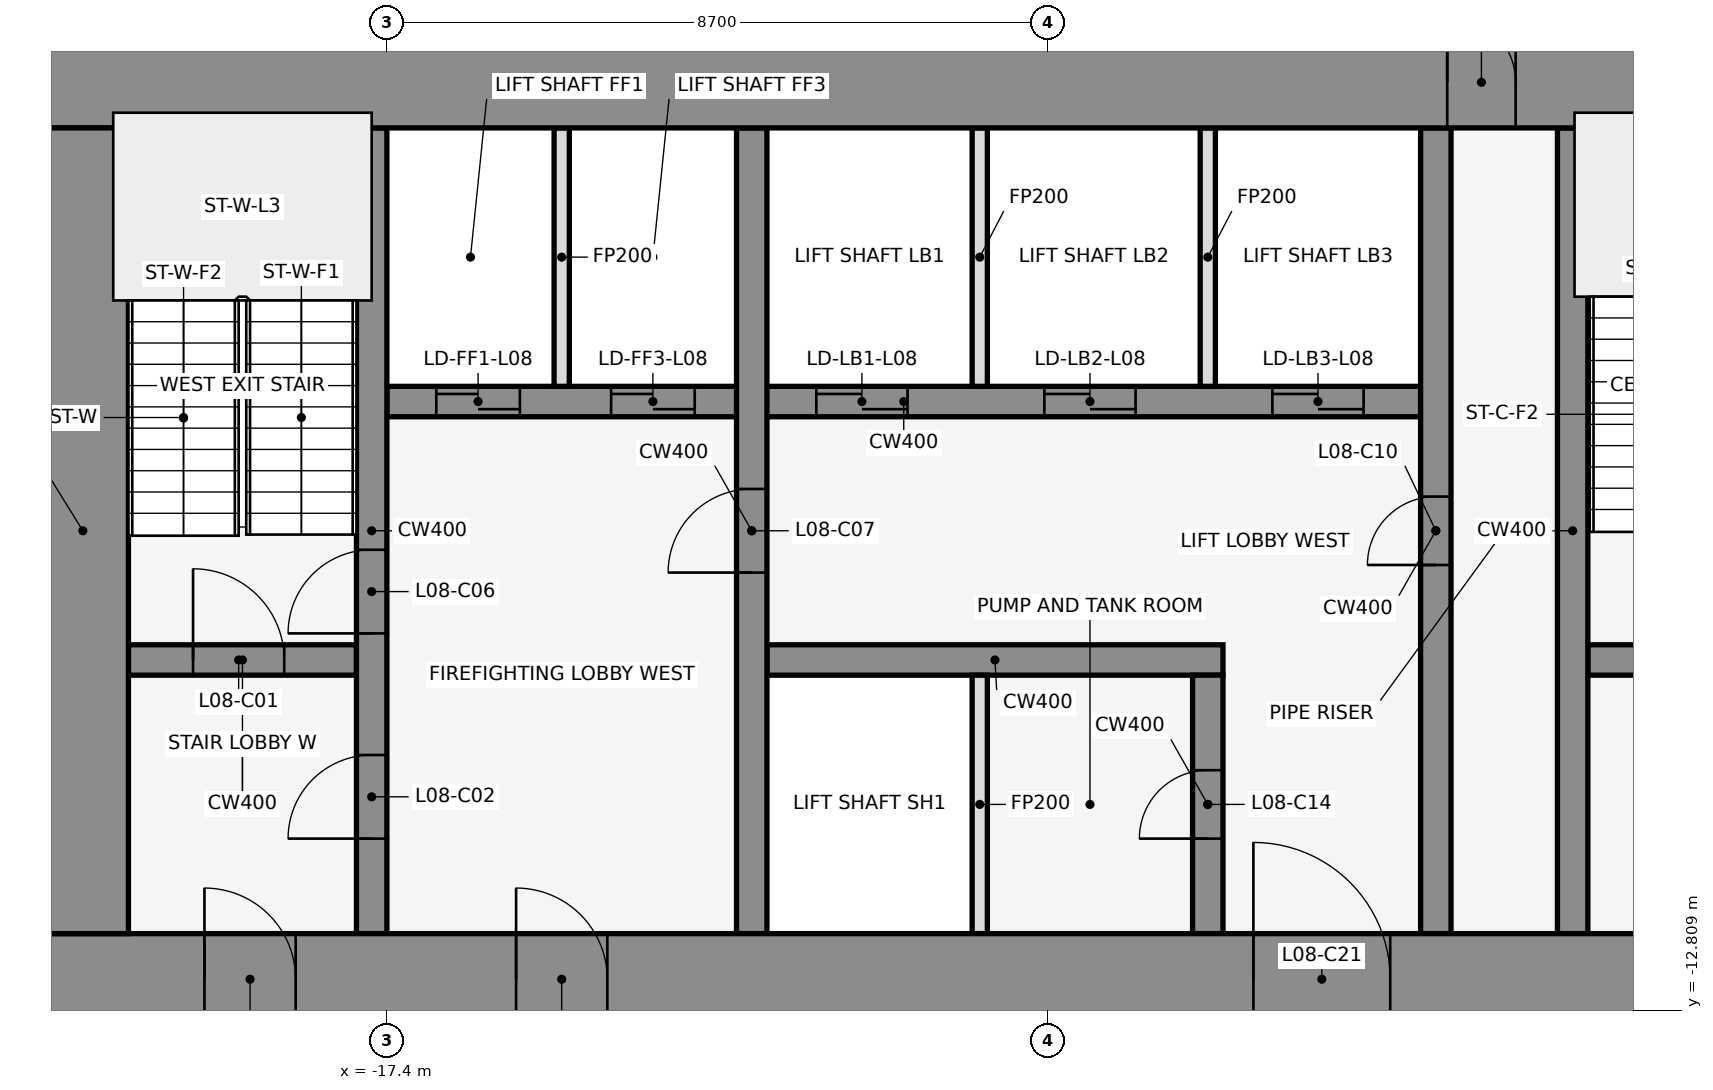
"""IFC4 building model, lengths in metres.
Left out: names, types, materials, properties, quantities, classifications, styles, units other than length and angle.
Written with IfcOpenShell. Run it as: python <this file> out.ifc"""

import sys

from ifc_helpers import new_model, si_unit, direction, frame, frame_2d, origin, place, context, subcontext, project, spatial, rectangle, extrude, element, fill, save


model = new_model("IFC4")
c1 = context("Model", 3, precision=1e-05, world=origin(), true_north=direction((0.0, 1.0)))
c2 = subcontext(c1, "Body", "Model", "MODEL_VIEW")
j1 = project(units=[si_unit("LENGTHUNIT", "METRE"), si_unit("PLANEANGLEUNIT", "RADIAN")], contexts=[c1])
p1 = place(None, origin())
s1 = spatial("IfcSite", under=j1, at=p1, CompositionType="ELEMENT")
p2 = place(p1, origin())
s2 = spatial("IfcBuilding", under=s1, at=p2, CompositionType="ELEMENT")
p3 = place(p2, frame((0.0, 0.0, 44.0)))
s3 = spatial("IfcBuildingStorey", under=s2, at=p3, CompositionType="ELEMENT", Elevation=44.0)
for number, where, z_axis, x_axis in (
    (1, (-0.068, -0.105, 0.0), (0.0, 0.0, 1.0), (-0.84, 0.543, 0.0)),
    (2, (-14.599, 1.08, 0.0), (0.0, 0.0, 1.0), (-0.84, -0.543, 0.0)),
):
    element("IfcWall", number, at=place(p3, frame(where, z_axis=z_axis, x_axis=x_axis)), inside=s3, PredefinedType="STANDARD", context=c2, shape_type="SweptSolid", body=[
        extrude(rectangle(XDim=2.183, YDim=0.25, at=frame_2d((1.091, 0.0))), origin(), (0.0, 0.0, 1.0), 4.35),
    ])
p4 = place(p3, frame((-20.8, -8.2, 0.0), z_axis=(0.0, 0.0, 1.0), x_axis=(1.0, 0.0, 0.0)))
e3 = element("IfcWall", 3, at=p4, inside=s3, PredefinedType="SHEAR", context=c2, shape_type="SweptSolid", body=[
    extrude(rectangle(XDim=3.0, YDim=0.4, at=frame_2d((1.5, 0.0))), origin(), (0.0, 0.0, 1.0), 4.5),
])
p5 = place(p4, frame((0.85, 0.0, 0.0)))
e4 = element("IfcOpeningElement", 4, at=p5, cuts=e3, PredefinedType="OPENING", context=c2, shape_type="SweptSolid", body=[
    extrude(rectangle(XDim=1.2, YDim=2.1, at=frame_2d((0.6, 1.05))), frame((0.0, 0.212, 0.0), z_axis=(0.0, -1.0, 0.0), x_axis=(1.0, 0.0, 0.0)), (0.0, 0.0, 1.0), 0.424),
])
p6 = place(p3, frame((-12.4, -8.2, 0.0), z_axis=(0.0, 0.0, 1.0), x_axis=(1.0, 0.0, 0.0)))
e5 = element("IfcWall", 5, at=p6, inside=s3, PredefinedType="SHEAR", context=c2, shape_type="SweptSolid", body=[
    extrude(rectangle(XDim=6.0, YDim=0.4, at=frame_2d((3.0, 0.0))), origin(), (0.0, 0.0, 1.0), 4.5),
])
p7 = place(p3, frame((-1.6, -8.2, 0.0), z_axis=(0.0, 0.0, 1.0), x_axis=(1.0, 0.0, 0.0)))
e6 = element("IfcWall", 6, at=p7, inside=s3, PredefinedType="SHEAR", context=c2, shape_type="SweptSolid", body=[
    extrude(rectangle(XDim=3.2, YDim=0.4, at=frame_2d((1.6, 0.0))), origin(), (0.0, 0.0, 1.0), 4.5),
])
p8 = place(p7, frame((1.05, 0.0, 0.0)))
e7 = element("IfcOpeningElement", 7, at=p8, cuts=e6, PredefinedType="OPENING", context=c2, shape_type="SweptSolid", body=[
    extrude(rectangle(XDim=1.2, YDim=2.1, at=frame_2d((0.6, 1.05))), frame((0.0, 0.212, 0.0), z_axis=(0.0, -1.0, 0.0), x_axis=(1.0, 0.0, 0.0)), (0.0, 0.0, 1.0), 0.424),
])
p9 = place(p3, frame((-17.4, -4.8, 0.0), z_axis=(0.0, 0.0, 1.0), x_axis=(1.0, 0.0, 0.0)))
e8 = element("IfcWall", 8, at=p9, inside=s3, PredefinedType="SHEAR", context=c2, shape_type="SweptSolid", body=[
    extrude(rectangle(XDim=13.6, YDim=0.4, at=frame_2d((6.8, 0.0))), origin(), (0.0, 0.0, 1.0), 4.5),
])
p10 = place(p9, frame((0.65, 0.0, 0.0)))
e9 = element("IfcOpeningElement", 9, at=p10, cuts=e8, PredefinedType="OPENING", context=c2, shape_type="SweptSolid", body=[
    extrude(rectangle(XDim=1.1, YDim=2.1, at=frame_2d((0.55, 1.05))), frame((0.0, 0.212, 0.0), z_axis=(0.0, -1.0, 0.0), x_axis=(1.0, 0.0, 0.0)), (0.0, 0.0, 1.0), 0.424),
])
p11 = place(p9, frame((2.95, 0.0, 0.0)))
e10 = element("IfcOpeningElement", 10, at=p11, cuts=e8, PredefinedType="OPENING", context=c2, shape_type="SweptSolid", body=[
    extrude(rectangle(XDim=1.1, YDim=2.1, at=frame_2d((0.55, 1.05))), frame((0.0, 0.212, 0.0), z_axis=(0.0, -1.0, 0.0), x_axis=(1.0, 0.0, 0.0)), (0.0, 0.0, 1.0), 0.424),
])
p12 = place(p9, frame((5.65, 0.0, 0.0)))
e11 = element("IfcOpeningElement", 11, at=p12, cuts=e8, PredefinedType="OPENING", context=c2, shape_type="SweptSolid", body=[
    extrude(rectangle(XDim=1.2, YDim=2.1, at=frame_2d((0.6, 1.05))), frame((0.0, 0.212, 0.0), z_axis=(0.0, -1.0, 0.0), x_axis=(1.0, 0.0, 0.0)), (0.0, 0.0, 1.0), 0.424),
])
p13 = place(p9, frame((8.65, 0.0, 0.0)))
e12 = element("IfcOpeningElement", 12, at=p13, cuts=e8, PredefinedType="OPENING", context=c2, shape_type="SweptSolid", body=[
    extrude(rectangle(XDim=1.2, YDim=2.1, at=frame_2d((0.6, 1.05))), frame((0.0, 0.212, 0.0), z_axis=(0.0, -1.0, 0.0), x_axis=(1.0, 0.0, 0.0)), (0.0, 0.0, 1.0), 0.424),
])
p14 = place(p9, frame((11.65, 0.0, 0.0)))
e13 = element("IfcOpeningElement", 13, at=p14, cuts=e8, PredefinedType="OPENING", context=c2, shape_type="SweptSolid", body=[
    extrude(rectangle(XDim=1.2, YDim=2.1, at=frame_2d((0.6, 1.05))), frame((0.0, 0.212, 0.0), z_axis=(0.0, -1.0, 0.0), x_axis=(1.0, 0.0, 0.0)), (0.0, 0.0, 1.0), 0.424),
])
p15 = place(p3, frame((-17.6, -11.8, 0.0), z_axis=(0.0, 0.0, 1.0), x_axis=(0.0, 1.0, 0.0)))
e14 = element("IfcWall", 14, at=p15, inside=s3, PredefinedType="SHEAR", context=c2, shape_type="SweptSolid", body=[
    extrude(rectangle(XDim=10.6, YDim=0.4, at=frame_2d((5.3, 0.0))), origin(), (0.0, 0.0, 1.0), 4.5),
])
p16 = place(p15, frame((1.25, 0.0, 0.0)))
e15 = element("IfcOpeningElement", 15, at=p16, cuts=e14, PredefinedType="OPENING", context=c2, shape_type="SweptSolid", body=[
    extrude(rectangle(XDim=1.1, YDim=2.1, at=frame_2d((0.55, 1.05))), frame((0.0, 0.212, 0.0), z_axis=(0.0, -1.0, 0.0), x_axis=(1.0, 0.0, 0.0)), (0.0, 0.0, 1.0), 0.424),
])
p17 = place(p15, frame((3.95, 0.0, 0.0)))
e16 = element("IfcOpeningElement", 16, at=p17, cuts=e14, PredefinedType="OPENING", context=c2, shape_type="SweptSolid", body=[
    extrude(rectangle(XDim=1.1, YDim=2.1, at=frame_2d((0.55, 1.05))), frame((0.0, 0.212, 0.0), z_axis=(0.0, -1.0, 0.0), x_axis=(1.0, 0.0, 0.0)), (0.0, 0.0, 1.0), 0.424),
])
p18 = place(p3, frame((-15.1, -4.6, 0.0), z_axis=(0.0, 0.0, 1.0), x_axis=(0.0, 1.0, 0.0)))
e17 = element("IfcWall", 17, at=p18, inside=s3, PredefinedType="PARTITIONING", context=c2, shape_type="SweptSolid", body=[
    extrude(rectangle(XDim=3.4, YDim=0.2, at=frame_2d((1.7, 0.0))), origin(), (0.0, 0.0, 1.0), 3.418),
])
p19 = place(p3, frame((-12.6, -11.8, 0.0), z_axis=(0.0, 0.0, 1.0), x_axis=(0.0, 1.0, 0.0)))
e18 = element("IfcWall", 18, at=p19, inside=s3, PredefinedType="SHEAR", context=c2, shape_type="SweptSolid", body=[
    extrude(rectangle(XDim=10.6, YDim=0.4, at=frame_2d((5.3, 0.0))), origin(), (0.0, 0.0, 1.0), 4.5),
])
p20 = place(p19, frame((4.75, 0.0, 0.0)))
e19 = element("IfcOpeningElement", 19, at=p20, cuts=e18, PredefinedType="OPENING", context=c2, shape_type="SweptSolid", body=[
    extrude(rectangle(XDim=1.1, YDim=2.1, at=frame_2d((0.55, 1.05))), frame((0.0, 0.212, 0.0), z_axis=(0.0, -1.0, 0.0), x_axis=(1.0, 0.0, 0.0)), (0.0, 0.0, 1.0), 0.424),
])
for number, where, z_axis, x_axis in (
    (20, (-9.6, -11.8, 0.0), (0.0, 0.0, 1.0), (0.0, 1.0, 0.0)),
    (21, (-9.6, -4.6, 0.0), (0.0, 0.0, 1.0), (0.0, 1.0, 0.0)),
):
    element("IfcWall", number, at=place(p3, frame(where, z_axis=z_axis, x_axis=x_axis)), inside=s3, PredefinedType="PARTITIONING", context=c2, shape_type="SweptSolid", body=[
        extrude(rectangle(XDim=3.4, YDim=0.2, at=frame_2d((1.7, 0.0))), origin(), (0.0, 0.0, 1.0), 3.418),
    ])
p21 = place(p3, frame((-6.6, -11.8, 0.0), z_axis=(0.0, 0.0, 1.0), x_axis=(0.0, 1.0, 0.0)))
e22 = element("IfcWall", 22, at=p21, inside=s3, PredefinedType="SHEAR", context=c2, shape_type="SweptSolid", body=[
    extrude(rectangle(XDim=3.4, YDim=0.4, at=frame_2d((1.7, 0.0))), origin(), (0.0, 0.0, 1.0), 4.5),
])
p22 = place(p21, frame((1.25, 0.0, 0.0)))
e23 = element("IfcOpeningElement", 23, at=p22, cuts=e22, PredefinedType="OPENING", context=c2, shape_type="SweptSolid", body=[
    extrude(rectangle(XDim=0.9, YDim=2.1, at=frame_2d((0.45, 1.05))), frame((0.0, 0.212, 0.0), z_axis=(0.0, -1.0, 0.0), x_axis=(1.0, 0.0, 0.0)), (0.0, 0.0, 1.0), 0.424),
])
p23 = place(p3, frame((-6.6, -4.6, 0.0), z_axis=(0.0, 0.0, 1.0), x_axis=(0.0, 1.0, 0.0)))
e24 = element("IfcWall", 24, at=p23, inside=s3, PredefinedType="PARTITIONING", context=c2, shape_type="SweptSolid", body=[
    extrude(rectangle(XDim=3.4, YDim=0.2, at=frame_2d((1.7, 0.0))), origin(), (0.0, 0.0, 1.0), 3.418),
])
p24 = place(p3, frame((-3.6, -11.8, 0.0), z_axis=(0.0, 0.0, 1.0), x_axis=(0.0, 1.0, 0.0)))
e25 = element("IfcWall", 25, at=p24, inside=s3, PredefinedType="SHEAR", context=c2, shape_type="SweptSolid", body=[
    extrude(rectangle(XDim=10.6, YDim=0.4, at=frame_2d((5.3, 0.0))), origin(), (0.0, 0.0, 1.0), 4.5),
])
p25 = place(p24, frame((4.85, 0.0, 0.0)))
e26 = element("IfcOpeningElement", 26, at=p25, cuts=e25, PredefinedType="OPENING", context=c2, shape_type="SweptSolid", body=[
    extrude(rectangle(XDim=0.9, YDim=2.1, at=frame_2d((0.45, 1.05))), frame((0.0, 0.212, 0.0), z_axis=(0.0, -1.0, 0.0), x_axis=(1.0, 0.0, 0.0)), (0.0, 0.0, 1.0), 0.424),
])
p26 = place(p3, frame((-1.8, -11.8, 0.0), z_axis=(0.0, 0.0, 1.0), x_axis=(0.0, 1.0, 0.0)))
e27 = element("IfcWall", 27, at=p26, inside=s3, PredefinedType="SHEAR", context=c2, shape_type="SweptSolid", body=[
    extrude(rectangle(XDim=10.6, YDim=0.4, at=frame_2d((5.3, 0.0))), origin(), (0.0, 0.0, 1.0), 4.5),
])
p27 = place(p3, frame((-22.0, -0.6, 0.0), z_axis=(0.0, 0.0, 1.0), x_axis=(1.0, 0.0, 0.0)))
e28 = element("IfcWall", 28, at=p27, inside=s3, PredefinedType="SHEAR", context=c2, shape_type="SweptSolid", body=[
    extrude(rectangle(XDim=44.0, YDim=1.2, at=frame_2d((22.0, 0.0))), origin(), (0.0, 0.0, 1.0), 4.5),
])
p28 = place(p27, frame((18.55, 0.0, 0.0)))
e29 = element("IfcOpeningElement", 29, at=p28, cuts=e28, PredefinedType="OPENING", context=c2, shape_type="SweptSolid", body=[
    extrude(rectangle(XDim=0.9, YDim=2.1, at=frame_2d((0.45, 1.05))), frame((0.0, 0.612, 0.0), z_axis=(0.0, -1.0, 0.0), x_axis=(1.0, 0.0, 0.0)), (0.0, 0.0, 1.0), 1.224),
])
p29 = place(p27, frame((24.55, 0.0, 0.0)))
e30 = element("IfcOpeningElement", 30, at=p29, cuts=e28, PredefinedType="OPENING", context=c2, shape_type="SweptSolid", body=[
    extrude(rectangle(XDim=0.9, YDim=2.1, at=frame_2d((0.45, 1.05))), frame((0.0, 0.612, 0.0), z_axis=(0.0, -1.0, 0.0), x_axis=(1.0, 0.0, 0.0)), (0.0, 0.0, 1.0), 1.224),
])
p30 = place(p3, frame((-22.0, -12.4, 0.0), z_axis=(0.0, 0.0, 1.0), x_axis=(1.0, 0.0, 0.0)))
e31 = element("IfcWall", 31, at=p30, inside=s3, PredefinedType="SHEAR", context=c2, shape_type="SweptSolid", body=[
    extrude(rectangle(XDim=44.0, YDim=1.2, at=frame_2d((22.0, 0.0))), origin(), (0.0, 0.0, 1.0), 4.5),
])
p31 = place(p30, frame((2.2, 0.0, 0.0)))
e32 = element("IfcOpeningElement", 32, at=p31, cuts=e31, PredefinedType="OPENING", context=c2, shape_type="SweptSolid", body=[
    extrude(rectangle(XDim=1.2, YDim=2.1, at=frame_2d((0.6, 1.05))), frame((0.0, 0.612, 0.0), z_axis=(0.0, -1.0, 0.0), x_axis=(1.0, 0.0, 0.0)), (0.0, 0.0, 1.0), 1.224),
])
p32 = place(p30, frame((21.4, 0.0, 0.0)))
e33 = element("IfcOpeningElement", 33, at=p32, cuts=e31, PredefinedType="OPENING", context=c2, shape_type="SweptSolid", body=[
    extrude(rectangle(XDim=1.2, YDim=2.1, at=frame_2d((0.6, 1.05))), frame((0.0, 0.612, 0.0), z_axis=(0.0, -1.0, 0.0), x_axis=(1.0, 0.0, 0.0)), (0.0, 0.0, 1.0), 1.224),
])
p33 = place(p30, frame((40.6, 0.0, 0.0)))
e34 = element("IfcOpeningElement", 34, at=p33, cuts=e31, PredefinedType="OPENING", context=c2, shape_type="SweptSolid", body=[
    extrude(rectangle(XDim=1.2, YDim=2.1, at=frame_2d((0.6, 1.05))), frame((0.0, 0.612, 0.0), z_axis=(0.0, -1.0, 0.0), x_axis=(1.0, 0.0, 0.0)), (0.0, 0.0, 1.0), 1.224),
])
p34 = place(p30, frame((16.0, 0.0, 0.0)))
e35 = element("IfcOpeningElement", 35, at=p34, cuts=e31, PredefinedType="OPENING", context=c2, shape_type="SweptSolid", body=[
    extrude(rectangle(XDim=1.8, YDim=2.1, at=frame_2d((0.9, 1.05))), frame((0.0, 0.612, 0.0), z_axis=(0.0, -1.0, 0.0), x_axis=(1.0, 0.0, 0.0)), (0.0, 0.0, 1.0), 1.224),
])
p35 = place(p30, frame((6.3, 0.0, 0.0)))
e36 = element("IfcOpeningElement", 36, at=p35, cuts=e31, PredefinedType="OPENING", context=c2, shape_type="SweptSolid", body=[
    extrude(rectangle(XDim=1.2, YDim=2.1, at=frame_2d((0.6, 1.05))), frame((0.0, 0.612, 0.0), z_axis=(0.0, -1.0, 0.0), x_axis=(1.0, 0.0, 0.0)), (0.0, 0.0, 1.0), 1.224),
])
p36 = place(p30, frame((26.2, 0.0, 0.0)))
e37 = element("IfcOpeningElement", 37, at=p36, cuts=e31, PredefinedType="OPENING", context=c2, shape_type="SweptSolid", body=[
    extrude(rectangle(XDim=1.8, YDim=2.1, at=frame_2d((0.9, 1.05))), frame((0.0, 0.612, 0.0), z_axis=(0.0, -1.0, 0.0), x_axis=(1.0, 0.0, 0.0)), (0.0, 0.0, 1.0), 1.224),
])
p37 = place(p30, frame((36.5, 0.0, 0.0)))
e38 = element("IfcOpeningElement", 38, at=p37, cuts=e31, PredefinedType="OPENING", context=c2, shape_type="SweptSolid", body=[
    extrude(rectangle(XDim=1.2, YDim=2.1, at=frame_2d((0.6, 1.05))), frame((0.0, 0.612, 0.0), z_axis=(0.0, -1.0, 0.0), x_axis=(1.0, 0.0, 0.0)), (0.0, 0.0, 1.0), 1.224),
])
p38 = place(p3, frame((-21.4, -11.8, 0.0), z_axis=(0.0, 0.0, 1.0), x_axis=(0.0, 1.0, 0.0)))
e39 = element("IfcWall", 39, at=p38, inside=s3, PredefinedType="SHEAR", context=c2, shape_type="SweptSolid", body=[
    extrude(rectangle(XDim=10.6, YDim=1.2, at=frame_2d((5.3, 0.0))), origin(), (0.0, 0.0, 1.0), 4.5),
])
p39 = place(p5, origin())
e40 = element("IfcDoor", 40, at=p39, inside=s3, OperationType="SINGLE_SWING_LEFT", PredefinedType="DOOR", context=c2, shape_type="SweptSolid", body=[
    extrude(rectangle(XDim=1.2, YDim=2.1, at=frame_2d((0.6, 1.05))), frame((0.0, 0.025, 0.0), z_axis=(0.0, -1.0, 0.0), x_axis=(1.0, 0.0, 0.0)), (0.0, 0.0, 1.0), 0.05),
])
fill(e4, e40)
p40 = place(p16, frame((1.1, 0.0, 0.0), z_axis=(0.0, 0.0, 1.0), x_axis=(-1.0, 0.0, 0.0)))
e41 = element("IfcDoor", 41, at=p40, inside=s3, OperationType="SINGLE_SWING_LEFT", PredefinedType="DOOR", context=c2, shape_type="SweptSolid", body=[
    extrude(rectangle(XDim=1.1, YDim=2.1, at=frame_2d((0.55, 1.05))), frame((0.0, 0.025, 0.0), z_axis=(0.0, -1.0, 0.0), x_axis=(1.0, 0.0, 0.0)), (0.0, 0.0, 1.0), 0.05),
])
fill(e15, e41)
p41 = place(p10, origin())
e42 = element("IfcDoor", 42, at=p41, inside=s3, OperationType="DOUBLE_DOOR_SLIDING", PredefinedType="DOOR", context=c2, shape_type="SweptSolid", body=[
    extrude(rectangle(XDim=1.1, YDim=2.1, at=frame_2d((0.55, 1.05))), frame((0.0, 0.025, 0.0), z_axis=(0.0, -1.0, 0.0), x_axis=(1.0, 0.0, 0.0)), (0.0, 0.0, 1.0), 0.05),
])
fill(e9, e42)
p42 = place(p11, origin())
e43 = element("IfcDoor", 43, at=p42, inside=s3, OperationType="DOUBLE_DOOR_SLIDING", PredefinedType="DOOR", context=c2, shape_type="SweptSolid", body=[
    extrude(rectangle(XDim=1.1, YDim=2.1, at=frame_2d((0.55, 1.05))), frame((0.0, 0.025, 0.0), z_axis=(0.0, -1.0, 0.0), x_axis=(1.0, 0.0, 0.0)), (0.0, 0.0, 1.0), 0.05),
])
fill(e10, e43)
p43 = place(p12, origin())
e44 = element("IfcDoor", 44, at=p43, inside=s3, OperationType="DOUBLE_DOOR_SLIDING", PredefinedType="DOOR", context=c2, shape_type="SweptSolid", body=[
    extrude(rectangle(XDim=1.2, YDim=2.1, at=frame_2d((0.6, 1.05))), frame((0.0, 0.025, 0.0), z_axis=(0.0, -1.0, 0.0), x_axis=(1.0, 0.0, 0.0)), (0.0, 0.0, 1.0), 0.05),
])
fill(e11, e44)
p44 = place(p13, origin())
e45 = element("IfcDoor", 45, at=p44, inside=s3, OperationType="DOUBLE_DOOR_SLIDING", PredefinedType="DOOR", context=c2, shape_type="SweptSolid", body=[
    extrude(rectangle(XDim=1.2, YDim=2.1, at=frame_2d((0.6, 1.05))), frame((0.0, 0.025, 0.0), z_axis=(0.0, -1.0, 0.0), x_axis=(1.0, 0.0, 0.0)), (0.0, 0.0, 1.0), 0.05),
])
fill(e12, e45)
p45 = place(p14, origin())
e46 = element("IfcDoor", 46, at=p45, inside=s3, OperationType="DOUBLE_DOOR_SLIDING", PredefinedType="DOOR", context=c2, shape_type="SweptSolid", body=[
    extrude(rectangle(XDim=1.2, YDim=2.1, at=frame_2d((0.6, 1.05))), frame((0.0, 0.025, 0.0), z_axis=(0.0, -1.0, 0.0), x_axis=(1.0, 0.0, 0.0)), (0.0, 0.0, 1.0), 0.05),
])
fill(e13, e46)
p46 = place(p17, frame((1.1, 0.0, 0.0), z_axis=(0.0, 0.0, 1.0), x_axis=(-1.0, 0.0, 0.0)))
e47 = element("IfcDoor", 47, at=p46, inside=s3, OperationType="SINGLE_SWING_LEFT", PredefinedType="DOOR", context=c2, shape_type="SweptSolid", body=[
    extrude(rectangle(XDim=1.1, YDim=2.1, at=frame_2d((0.55, 1.05))), frame((0.0, 0.025, 0.0), z_axis=(0.0, -1.0, 0.0), x_axis=(1.0, 0.0, 0.0)), (0.0, 0.0, 1.0), 0.05),
])
fill(e16, e47)
p47 = place(p20, origin())
e48 = element("IfcDoor", 48, at=p47, inside=s3, OperationType="SINGLE_SWING_LEFT", PredefinedType="DOOR", context=c2, shape_type="SweptSolid", body=[
    extrude(rectangle(XDim=1.1, YDim=2.1, at=frame_2d((0.55, 1.05))), frame((0.0, 0.025, 0.0), z_axis=(0.0, -1.0, 0.0), x_axis=(1.0, 0.0, 0.0)), (0.0, 0.0, 1.0), 0.05),
])
fill(e19, e48)
p48 = place(p25, frame((0.9, 0.0, 0.0), z_axis=(0.0, 0.0, 1.0), x_axis=(-1.0, 0.0, 0.0)))
e49 = element("IfcDoor", 49, at=p48, inside=s3, OperationType="SINGLE_SWING_LEFT", PredefinedType="DOOR", context=c2, shape_type="SweptSolid", body=[
    extrude(rectangle(XDim=0.9, YDim=2.1, at=frame_2d((0.45, 1.05))), frame((0.0, 0.025, 0.0), z_axis=(0.0, -1.0, 0.0), x_axis=(1.0, 0.0, 0.0)), (0.0, 0.0, 1.0), 0.05),
])
fill(e26, e49)
p49 = place(p22, origin())
e50 = element("IfcDoor", 50, at=p49, inside=s3, OperationType="SINGLE_SWING_RIGHT", PredefinedType="DOOR", context=c2, shape_type="SweptSolid", body=[
    extrude(rectangle(XDim=0.9, YDim=2.1, at=frame_2d((0.45, 1.05))), frame((0.0, 0.025, 0.0), z_axis=(0.0, -1.0, 0.0), x_axis=(1.0, 0.0, 0.0)), (0.0, 0.0, 1.0), 0.05),
])
fill(e23, e50)
p50 = place(p28, origin())
e51 = element("IfcDoor", 51, at=p50, inside=s3, OperationType="SINGLE_SWING_LEFT", PredefinedType="DOOR", context=c2, shape_type="SweptSolid", body=[
    extrude(rectangle(XDim=0.9, YDim=2.1, at=frame_2d((0.45, 1.05))), frame((0.0, 0.025, 0.0), z_axis=(0.0, -1.0, 0.0), x_axis=(1.0, 0.0, 0.0)), (0.0, 0.0, 1.0), 0.05),
])
fill(e29, e51)
p51 = place(p31, frame((1.2, 0.0, 0.0), z_axis=(0.0, 0.0, 1.0), x_axis=(-1.0, 0.0, 0.0)))
e52 = element("IfcDoor", 52, at=p51, inside=s3, OperationType="SINGLE_SWING_RIGHT", PredefinedType="DOOR", context=c2, shape_type="SweptSolid", body=[
    extrude(rectangle(XDim=1.2, YDim=2.1, at=frame_2d((0.6, 1.05))), frame((0.0, 0.025, 0.0), z_axis=(0.0, -1.0, 0.0), x_axis=(1.0, 0.0, 0.0)), (0.0, 0.0, 1.0), 0.05),
])
fill(e32, e52)
p52 = place(p34, origin())
e53 = element("IfcDoor", 53, at=p52, inside=s3, OperationType="SINGLE_SWING_LEFT", PredefinedType="DOOR", context=c2, shape_type="SweptSolid", body=[
    extrude(rectangle(XDim=1.8, YDim=2.1, at=frame_2d((0.9, 1.05))), frame((0.0, 0.025, 0.0), z_axis=(0.0, -1.0, 0.0), x_axis=(1.0, 0.0, 0.0)), (0.0, 0.0, 1.0), 0.05),
])
fill(e35, e53)
p53 = place(p35, frame((1.2, 0.0, 0.0), z_axis=(0.0, 0.0, 1.0), x_axis=(-1.0, 0.0, 0.0)))
e54 = element("IfcDoor", 54, at=p53, inside=s3, OperationType="SINGLE_SWING_RIGHT", PredefinedType="DOOR", context=c2, shape_type="SweptSolid", body=[
    extrude(rectangle(XDim=1.2, YDim=2.1, at=frame_2d((0.6, 1.05))), frame((0.0, 0.025, 0.0), z_axis=(0.0, -1.0, 0.0), x_axis=(1.0, 0.0, 0.0)), (0.0, 0.0, 1.0), 0.05),
])
fill(e36, e54)
save(model, sys.argv[1])
